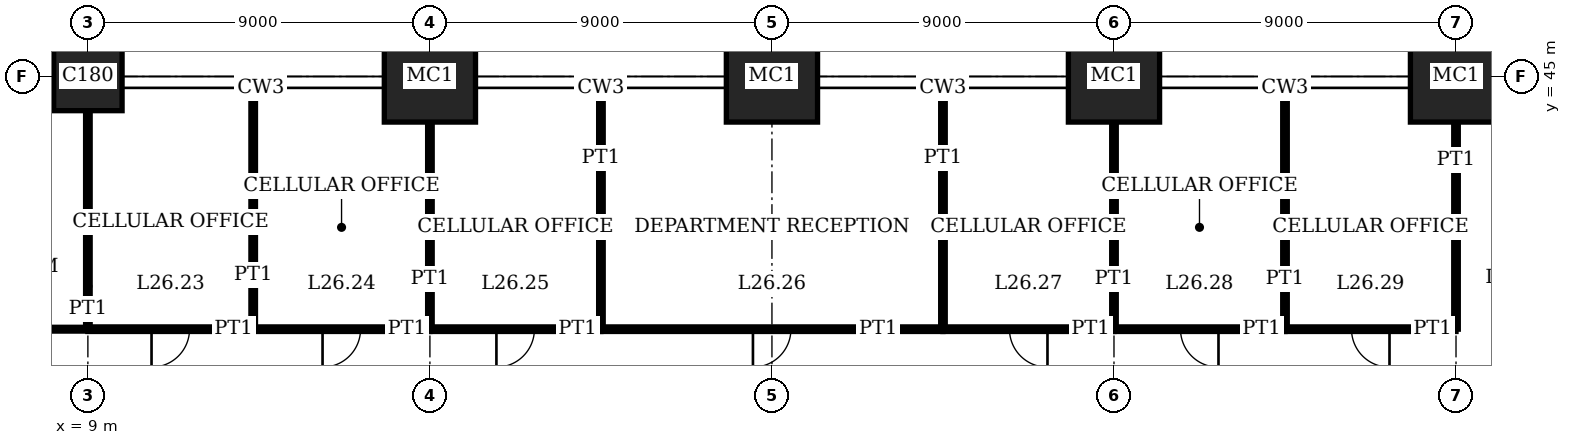
"""IFC4 building model, lengths in metres.
Left out: names, types, materials, properties, quantities, classifications, styles, units other than length and angle.
Written with IfcOpenShell. Run it as: python <this file> out.ifc"""

import sys

from ifc_helpers import new_model, si_unit, direction, frame, frame_2d, origin, origin_2d, place, context, subcontext, project, spatial, rectangle, extrude, element, fill, save


model = new_model("IFC4")
c1 = context("Model", 3, precision=1e-05, world=origin(), true_north=direction((0.0, 1.0)))
c2 = subcontext(c1, "Body", "Model", "MODEL_VIEW")
j1 = project(units=[si_unit("LENGTHUNIT", "METRE"), si_unit("PLANEANGLEUNIT", "RADIAN")], contexts=[c1])
p1 = place(None, origin())
s1 = spatial("IfcSite", under=j1, at=p1, CompositionType="ELEMENT")
p2 = place(p1, origin())
s2 = spatial("IfcBuilding", under=s1, at=p2, CompositionType="ELEMENT")
p3 = place(p2, frame((0.0, 0.0, 109.0)))
s3 = spatial("IfcBuildingStorey", under=s2, at=p3, CompositionType="ELEMENT", Elevation=109.0)
p4 = place(p3, frame((9.0, 45.0, 0.0), z_axis=(0.0, 0.0, 1.0), x_axis=(1.0, 0.0, 0.0)))
e1 = element("IfcColumn", 1, at=p4, inside=s3, PredefinedType="COLUMN", context=c2, shape_type="SweptSolid", body=[
    extrude(rectangle(XDim=1.8, YDim=1.8, at=origin_2d()), origin(), (0.0, 0.0, 1.0), 4.0),
])
for number, where, z_axis, x_axis in (
    (2, (18.0, 45.0, 0.0), (0.0, 0.0, 1.0), (1.0, 0.0, 0.0)),
    (3, (27.0, 45.0, 0.0), (0.0, 0.0, 1.0), (1.0, 0.0, 0.0)),
    (4, (36.0, 45.0, 0.0), (0.0, 0.0, 1.0), (1.0, 0.0, 0.0)),
    (5, (45.0, 45.0, 0.0), (0.0, 0.0, 1.0), (1.0, 0.0, 0.0)),
):
    element("IfcColumn", number, at=place(p3, frame(where, z_axis=z_axis, x_axis=x_axis)), inside=s3, PredefinedType="COLUMN", context=c2, shape_type="SweptSolid", body=[
        extrude(rectangle(XDim=2.4, YDim=2.4, at=origin_2d()), origin(), (0.0, 0.0, 1.0), 4.0),
    ])
p5 = place(p3, frame((9.0, 38.35, 0.0), z_axis=(0.0, 0.0, 1.0), x_axis=(1.0, 0.0, 0.0)))
e6 = element("IfcWall", 6, at=p5, inside=s3, PredefinedType="PARTITIONING", context=c2, shape_type="SweptSolid", body=[
    extrude(rectangle(XDim=4.35, YDim=0.12, at=frame_2d((2.175, 0.0))), origin(), (0.0, 0.0, 1.0), 3.75),
])
p6 = place(p5, frame((1.675, 0.0, 0.0)))
e7 = element("IfcOpeningElement", 7, at=p6, cuts=e6, PredefinedType="OPENING", context=c2, shape_type="SweptSolid", body=[
    extrude(rectangle(XDim=1.0, YDim=2.4, at=frame_2d((0.5, 1.2))), frame((0.0, 0.07, 0.0), z_axis=(0.0, -1.0, 0.0), x_axis=(1.0, 0.0, 0.0)), (0.0, 0.0, 1.0), 0.14),
])
p7 = place(p3, frame((13.35, 38.35, 0.0), z_axis=(0.0, 0.0, 1.0), x_axis=(1.0, 0.0, 0.0)))
e8 = element("IfcWall", 8, at=p7, inside=s3, PredefinedType="PARTITIONING", context=c2, shape_type="SweptSolid", body=[
    extrude(rectangle(XDim=4.65, YDim=0.12, at=frame_2d((2.325, 0.0))), origin(), (0.0, 0.0, 1.0), 3.75),
])
p8 = place(p7, frame((1.825, 0.0, 0.0)))
e9 = element("IfcOpeningElement", 9, at=p8, cuts=e8, PredefinedType="OPENING", context=c2, shape_type="SweptSolid", body=[
    extrude(rectangle(XDim=1.0, YDim=2.4, at=frame_2d((0.5, 1.2))), frame((0.0, 0.07, 0.0), z_axis=(0.0, -1.0, 0.0), x_axis=(1.0, 0.0, 0.0)), (0.0, 0.0, 1.0), 0.14),
])
p9 = place(p3, frame((18.0, 38.35, 0.0), z_axis=(0.0, 0.0, 1.0), x_axis=(1.0, 0.0, 0.0)))
e10 = element("IfcWall", 10, at=p9, inside=s3, PredefinedType="PARTITIONING", context=c2, shape_type="SweptSolid", body=[
    extrude(rectangle(XDim=4.5, YDim=0.12, at=frame_2d((2.25, 0.0))), origin(), (0.0, 0.0, 1.0), 3.75),
])
p10 = place(p9, frame((1.75, 0.0, 0.0)))
e11 = element("IfcOpeningElement", 11, at=p10, cuts=e10, PredefinedType="OPENING", context=c2, shape_type="SweptSolid", body=[
    extrude(rectangle(XDim=1.0, YDim=2.4, at=frame_2d((0.5, 1.2))), frame((0.0, 0.07, 0.0), z_axis=(0.0, -1.0, 0.0), x_axis=(1.0, 0.0, 0.0)), (0.0, 0.0, 1.0), 0.14),
])
p11 = place(p3, frame((22.5, 38.35, 0.0), z_axis=(0.0, 0.0, 1.0), x_axis=(1.0, 0.0, 0.0)))
e12 = element("IfcWall", 12, at=p11, inside=s3, PredefinedType="PARTITIONING", context=c2, shape_type="SweptSolid", body=[
    extrude(rectangle(XDim=9.0, YDim=0.12, at=frame_2d((4.5, 0.0))), origin(), (0.0, 0.0, 1.0), 3.75),
])
p12 = place(p11, frame((4.0, 0.0, 0.0)))
e13 = element("IfcOpeningElement", 13, at=p12, cuts=e12, PredefinedType="OPENING", context=c2, shape_type="SweptSolid", body=[
    extrude(rectangle(XDim=1.0, YDim=2.4, at=frame_2d((0.5, 1.2))), frame((0.0, 0.07, 0.0), z_axis=(0.0, -1.0, 0.0), x_axis=(1.0, 0.0, 0.0)), (0.0, 0.0, 1.0), 0.14),
])
p13 = place(p3, frame((31.5, 38.35, 0.0), z_axis=(0.0, 0.0, 1.0), x_axis=(1.0, 0.0, 0.0)))
e14 = element("IfcWall", 14, at=p13, inside=s3, PredefinedType="PARTITIONING", context=c2, shape_type="SweptSolid", body=[
    extrude(rectangle(XDim=4.5, YDim=0.12, at=frame_2d((2.25, 0.0))), origin(), (0.0, 0.0, 1.0), 3.75),
])
p14 = place(p13, frame((1.75, 0.0, 0.0)))
e15 = element("IfcOpeningElement", 15, at=p14, cuts=e14, PredefinedType="OPENING", context=c2, shape_type="SweptSolid", body=[
    extrude(rectangle(XDim=1.0, YDim=2.4, at=frame_2d((0.5, 1.2))), frame((0.0, 0.07, 0.0), z_axis=(0.0, -1.0, 0.0), x_axis=(1.0, 0.0, 0.0)), (0.0, 0.0, 1.0), 0.14),
])
p15 = place(p3, frame((36.0, 38.35, 0.0), z_axis=(0.0, 0.0, 1.0), x_axis=(1.0, 0.0, 0.0)))
e16 = element("IfcWall", 16, at=p15, inside=s3, PredefinedType="PARTITIONING", context=c2, shape_type="SweptSolid", body=[
    extrude(rectangle(XDim=4.5, YDim=0.12, at=frame_2d((2.25, 0.0))), origin(), (0.0, 0.0, 1.0), 3.75),
])
p16 = place(p15, frame((1.75, 0.0, 0.0)))
e17 = element("IfcOpeningElement", 17, at=p16, cuts=e16, PredefinedType="OPENING", context=c2, shape_type="SweptSolid", body=[
    extrude(rectangle(XDim=1.0, YDim=2.4, at=frame_2d((0.5, 1.2))), frame((0.0, 0.07, 0.0), z_axis=(0.0, -1.0, 0.0), x_axis=(1.0, 0.0, 0.0)), (0.0, 0.0, 1.0), 0.14),
])
p17 = place(p3, frame((40.5, 38.35, 0.0), z_axis=(0.0, 0.0, 1.0), x_axis=(1.0, 0.0, 0.0)))
e18 = element("IfcWall", 18, at=p17, inside=s3, PredefinedType="PARTITIONING", context=c2, shape_type="SweptSolid", body=[
    extrude(rectangle(XDim=4.5, YDim=0.12, at=frame_2d((2.25, 0.0))), origin(), (0.0, 0.0, 1.0), 3.75),
])
p18 = place(p17, frame((1.75, 0.0, 0.0)))
e19 = element("IfcOpeningElement", 19, at=p18, cuts=e18, PredefinedType="OPENING", context=c2, shape_type="SweptSolid", body=[
    extrude(rectangle(XDim=1.0, YDim=2.4, at=frame_2d((0.5, 1.2))), frame((0.0, 0.07, 0.0), z_axis=(0.0, -1.0, 0.0), x_axis=(1.0, 0.0, 0.0)), (0.0, 0.0, 1.0), 0.14),
])
p19 = place(p3, frame((0.852, 38.35, 0.0), z_axis=(0.0, 0.0, 1.0), x_axis=(1.0, 0.0, 0.0)))
e20 = element("IfcWall", 20, at=p19, inside=s3, PredefinedType="PARTITIONING", context=c2, shape_type="SweptSolid", body=[
    extrude(rectangle(XDim=8.148, YDim=0.1, at=frame_2d((4.074, 0.0))), origin(), (0.0, 0.0, 1.0), 3.75),
])
p20 = place(p19, frame((2.648, 0.0, 0.0)))
e21 = element("IfcOpeningElement", 21, at=p20, cuts=e20, PredefinedType="OPENING", context=c2, shape_type="SweptSolid", body=[
    extrude(rectangle(XDim=1.0, YDim=2.4, at=frame_2d((0.5, 1.2))), frame((0.0, 0.06, 0.0), z_axis=(0.0, -1.0, 0.0), x_axis=(1.0, 0.0, 0.0)), (0.0, 0.0, 1.0), 0.12),
])
p21 = place(p3, frame((9.0, 38.35, 0.0), z_axis=(0.0, 0.0, 1.0), x_axis=(0.0, 1.0, 0.0)))
e22 = element("IfcWall", 22, at=p21, inside=s3, PredefinedType="PARTITIONING", context=c2, shape_type="SweptSolid", body=[
    extrude(rectangle(XDim=5.75, YDim=0.12, at=frame_2d((2.875, 0.0))), origin(), (0.0, 0.0, 1.0), 3.05),
])
p22 = place(p3, frame((13.35, 38.35, 0.0), z_axis=(0.0, 0.0, 1.0), x_axis=(0.0, 1.0, 0.0)))
e23 = element("IfcWall", 23, at=p22, inside=s3, PredefinedType="PARTITIONING", context=c2, shape_type="SweptSolid", body=[
    extrude(rectangle(XDim=6.34, YDim=0.12, at=frame_2d((3.17, 0.0))), origin(), (0.0, 0.0, 1.0), 3.75),
])
p23 = place(p3, frame((18.0, 38.35, 0.0), z_axis=(0.0, 0.0, 1.0), x_axis=(0.0, 1.0, 0.0)))
e24 = element("IfcWall", 24, at=p23, inside=s3, PredefinedType="PARTITIONING", context=c2, shape_type="SweptSolid", body=[
    extrude(rectangle(XDim=5.45, YDim=0.12, at=frame_2d((2.725, 0.0))), origin(), (0.0, 0.0, 1.0), 3.05),
])
for number, where, z_axis, x_axis in (
    (25, (22.5, 38.35, 0.0), (0.0, 0.0, 1.0), (0.0, 1.0, 0.0)),
    (26, (31.5, 38.35, 0.0), (0.0, 0.0, 1.0), (0.0, 1.0, 0.0)),
):
    element("IfcWall", number, at=place(p3, frame(where, z_axis=z_axis, x_axis=x_axis)), inside=s3, PredefinedType="PARTITIONING", context=c2, shape_type="SweptSolid", body=[
        extrude(rectangle(XDim=6.34, YDim=0.12, at=frame_2d((3.17, 0.0))), origin(), (0.0, 0.0, 1.0), 3.75),
    ])
p24 = place(p3, frame((36.0, 38.35, 0.0), z_axis=(0.0, 0.0, 1.0), x_axis=(0.0, 1.0, 0.0)))
e27 = element("IfcWall", 27, at=p24, inside=s3, PredefinedType="PARTITIONING", context=c2, shape_type="SweptSolid", body=[
    extrude(rectangle(XDim=5.45, YDim=0.12, at=frame_2d((2.725, 0.0))), origin(), (0.0, 0.0, 1.0), 3.05),
])
p25 = place(p3, frame((40.5, 38.35, 0.0), z_axis=(0.0, 0.0, 1.0), x_axis=(0.0, 1.0, 0.0)))
e28 = element("IfcWall", 28, at=p25, inside=s3, PredefinedType="PARTITIONING", context=c2, shape_type="SweptSolid", body=[
    extrude(rectangle(XDim=6.34, YDim=0.12, at=frame_2d((3.17, 0.0))), origin(), (0.0, 0.0, 1.0), 3.75),
])
p26 = place(p3, frame((45.0, 38.35, 0.0), z_axis=(0.0, 0.0, 1.0), x_axis=(0.0, 1.0, 0.0)))
e29 = element("IfcWall", 29, at=p26, inside=s3, PredefinedType="PARTITIONING", context=c2, shape_type="SweptSolid", body=[
    extrude(rectangle(XDim=5.45, YDim=0.12, at=frame_2d((2.725, 0.0))), origin(), (0.0, 0.0, 1.0), 3.05),
])
p27 = place(p6, origin())
e30 = element("IfcDoor", 30, at=p27, inside=s3, OperationType="SINGLE_SWING_LEFT", PredefinedType="DOOR", context=c2, shape_type="SweptSolid", body=[
    extrude(rectangle(XDim=1.0, YDim=2.4, at=frame_2d((0.5, 1.2))), frame((0.0, 0.025, 0.0), z_axis=(0.0, -1.0, 0.0), x_axis=(1.0, 0.0, 0.0)), (0.0, 0.0, 1.0), 0.05),
])
fill(e7, e30)
p28 = place(p8, origin())
e31 = element("IfcDoor", 31, at=p28, inside=s3, OperationType="SINGLE_SWING_LEFT", PredefinedType="DOOR", context=c2, shape_type="SweptSolid", body=[
    extrude(rectangle(XDim=1.0, YDim=2.4, at=frame_2d((0.5, 1.2))), frame((0.0, 0.025, 0.0), z_axis=(0.0, -1.0, 0.0), x_axis=(1.0, 0.0, 0.0)), (0.0, 0.0, 1.0), 0.05),
])
fill(e9, e31)
p29 = place(p10, origin())
e32 = element("IfcDoor", 32, at=p29, inside=s3, OperationType="SINGLE_SWING_LEFT", PredefinedType="DOOR", context=c2, shape_type="SweptSolid", body=[
    extrude(rectangle(XDim=1.0, YDim=2.4, at=frame_2d((0.5, 1.2))), frame((0.0, 0.025, 0.0), z_axis=(0.0, -1.0, 0.0), x_axis=(1.0, 0.0, 0.0)), (0.0, 0.0, 1.0), 0.05),
])
fill(e11, e32)
p30 = place(p12, origin())
e33 = element("IfcDoor", 33, at=p30, inside=s3, OperationType="SINGLE_SWING_LEFT", PredefinedType="DOOR", context=c2, shape_type="SweptSolid", body=[
    extrude(rectangle(XDim=1.0, YDim=2.4, at=frame_2d((0.5, 1.2))), frame((0.0, 0.025, 0.0), z_axis=(0.0, -1.0, 0.0), x_axis=(1.0, 0.0, 0.0)), (0.0, 0.0, 1.0), 0.05),
])
fill(e13, e33)
p31 = place(p14, origin())
e34 = element("IfcDoor", 34, at=p31, inside=s3, OperationType="SINGLE_SWING_RIGHT", PredefinedType="DOOR", context=c2, shape_type="SweptSolid", body=[
    extrude(rectangle(XDim=1.0, YDim=2.4, at=frame_2d((0.5, 1.2))), frame((0.0, 0.025, 0.0), z_axis=(0.0, -1.0, 0.0), x_axis=(1.0, 0.0, 0.0)), (0.0, 0.0, 1.0), 0.05),
])
fill(e15, e34)
p32 = place(p16, origin())
e35 = element("IfcDoor", 35, at=p32, inside=s3, OperationType="SINGLE_SWING_RIGHT", PredefinedType="DOOR", context=c2, shape_type="SweptSolid", body=[
    extrude(rectangle(XDim=1.0, YDim=2.4, at=frame_2d((0.5, 1.2))), frame((0.0, 0.025, 0.0), z_axis=(0.0, -1.0, 0.0), x_axis=(1.0, 0.0, 0.0)), (0.0, 0.0, 1.0), 0.05),
])
fill(e17, e35)
p33 = place(p18, origin())
e36 = element("IfcDoor", 36, at=p33, inside=s3, OperationType="SINGLE_SWING_RIGHT", PredefinedType="DOOR", context=c2, shape_type="SweptSolid", body=[
    extrude(rectangle(XDim=1.0, YDim=2.4, at=frame_2d((0.5, 1.2))), frame((0.0, 0.025, 0.0), z_axis=(0.0, -1.0, 0.0), x_axis=(1.0, 0.0, 0.0)), (0.0, 0.0, 1.0), 0.05),
])
fill(e19, e36)
save(model, sys.argv[1])
